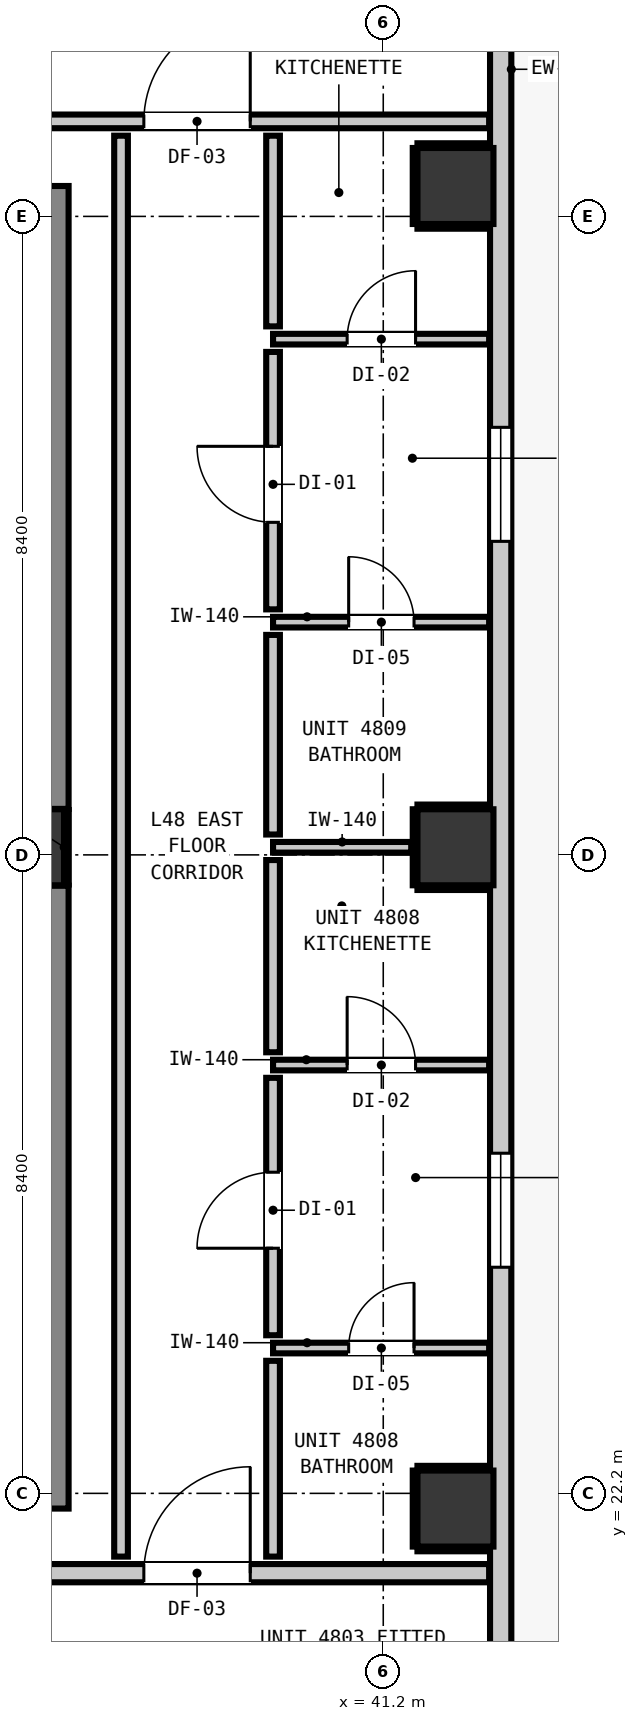
"""IFC4 building model, lengths in metres.
Left out: names, types, materials, properties, quantities, classifications, styles, units other than length and angle.
Written with IfcOpenShell. Run it as: python <this file> out.ifc"""

import sys

from ifc_helpers import new_model, si_unit, direction, frame, frame_2d, origin, origin_2d, place, context, subcontext, project, spatial, rectangle, extrude, element, fill, save


model = new_model("IFC4")
c1 = context("Model", 3, precision=1e-05, world=origin(), true_north=direction((0.0, 1.0)))
c2 = subcontext(c1, "Body", "Model", "MODEL_VIEW")
j1 = project(units=[si_unit("LENGTHUNIT", "METRE"), si_unit("PLANEANGLEUNIT", "RADIAN")], contexts=[c1])
p1 = place(None, origin())
s1 = spatial("IfcSite", under=j1, at=p1, CompositionType="ELEMENT")
p2 = place(p1, origin())
s2 = spatial("IfcBuilding", under=s1, at=p2, CompositionType="ELEMENT")
p3 = place(p2, frame((0.0, 0.0, 165.84)))
s3 = spatial("IfcBuildingStorey", under=s2, at=p3, CompositionType="ELEMENT", Elevation=165.84)
p4 = place(p3, frame((36.5, 30.7, 0.0), z_axis=(0.0, 0.0, 1.0), x_axis=(1.0, 0.0, 0.0)))
e1 = element("IfcColumn", 1, at=p4, inside=s3, PredefinedType="COLUMN", context=c2, shape_type="SweptSolid", body=[
    extrude(rectangle(XDim=1.0, YDim=1.0, at=origin_2d()), origin(), (0.0, 0.0, 1.0), 3.32),
])
p5 = place(p3, frame((36.56, 22.0, 0.0), z_axis=(0.0, 0.0, 1.0), x_axis=(0.0, 1.0, 0.0)))
e2 = element("IfcWall", 2, at=p5, inside=s3, PredefinedType="SHEAR", context=c2, shape_type="SweptSolid", body=[
    extrude(rectangle(XDim=8.195, YDim=1.0, at=frame_2d((4.098, 0.0))), origin(), (0.0, 0.0, 1.0), 3.32),
])
p6 = place(p3, frame((36.56, 31.205, 0.0), z_axis=(0.0, 0.0, 1.0), x_axis=(0.0, 1.0, 0.0)))
e3 = element("IfcWall", 3, at=p6, inside=s3, PredefinedType="SHEAR", context=c2, shape_type="SweptSolid", body=[
    extrude(rectangle(XDim=8.195, YDim=1.0, at=frame_2d((4.097, 0.0))), origin(), (0.0, 0.0, 1.0), 3.32),
])
for number, where, z_axis, x_axis in (
    (4, (42.15, 22.0, -0.2), (0.0, 0.0, 1.0), (1.0, 0.0, 0.0)),
    (5, (42.15, 30.7, -0.2), (0.0, 0.0, 1.0), (1.0, 0.0, 0.0)),
    (6, (42.15, 39.4, -0.2), (0.0, 0.0, 1.0), (1.0, 0.0, 0.0)),
):
    element("IfcColumn", number, at=place(p3, frame(where, z_axis=z_axis, x_axis=x_axis)), inside=s3, PredefinedType="COLUMN", context=c2, shape_type="SweptSolid", body=[
        extrude(rectangle(XDim=1.0, YDim=1.0, at=origin_2d()), origin(), (0.0, 0.0, 1.0), 3.52),
    ])
p7 = place(p3, frame((42.745, 49.845, 0.0), z_axis=(0.0, 0.0, 1.0), x_axis=(0.0, -1.0, 0.0)))
e7 = element("IfcWall", 7, at=p7, inside=s3, PredefinedType="STANDARD", context=c2, shape_type="SweptSolid", body=[
    extrude(rectangle(XDim=32.29, YDim=0.28, at=frame_2d((16.145, 0.0))), origin(), (0.0, 0.0, 1.0), 3.08),
])
p8 = place(p7, frame((0.503, 0.0, 0.0)))
e8 = element("IfcOpeningElement", 8, at=p8, cuts=e7, PredefinedType="OPENING", context=c2, shape_type="SweptSolid", body=[
    extrude(rectangle(XDim=1.1, YDim=2.15, at=frame_2d((0.55, 1.075))), frame((0.0, 0.15, 0.0), z_axis=(0.0, -1.0, 0.0), x_axis=(1.0, 0.0, 0.0)), (0.0, 0.0, 1.0), 0.3),
])
p9 = place(p7, frame((2.699, 0.0, 0.85)))
e9 = element("IfcOpeningElement", 9, at=p9, cuts=e7, PredefinedType="OPENING", context=c2, shape_type="SweptSolid", body=[
    extrude(rectangle(XDim=1.5, YDim=1.8, at=frame_2d((0.75, 0.9))), frame((0.0, 0.15, 0.0), z_axis=(0.0, -1.0, 0.0), x_axis=(1.0, 0.0, 0.0)), (0.0, 0.0, 1.0), 0.3),
])
p10 = place(p7, frame((23.17, 0.0, 0.85)))
e10 = element("IfcOpeningElement", 10, at=p10, cuts=e7, PredefinedType="OPENING", context=c2, shape_type="SweptSolid", body=[
    extrude(rectangle(XDim=1.5, YDim=1.8, at=frame_2d((0.75, 0.9))), frame((0.0, 0.15, 0.0), z_axis=(0.0, -1.0, 0.0), x_axis=(1.0, 0.0, 0.0)), (0.0, 0.0, 1.0), 0.3),
])
p11 = place(p7, frame((13.62, 0.0, 0.85)))
e11 = element("IfcOpeningElement", 11, at=p11, cuts=e7, PredefinedType="OPENING", context=c2, shape_type="SweptSolid", body=[
    extrude(rectangle(XDim=1.5, YDim=1.8, at=frame_2d((0.75, 0.9))), frame((0.0, 0.15, 0.0), z_axis=(0.0, -1.0, 0.0), x_axis=(1.0, 0.0, 0.0)), (0.0, 0.0, 1.0), 0.3),
])
p12 = place(p3, frame((12.983, 21.15, 0.0), z_axis=(0.0, 0.0, 1.0), x_axis=(1.0, 0.0, 0.0)))
e12 = element("IfcWall", 12, at=p12, inside=s3, PredefinedType="PARTITIONING", context=c2, shape_type="SweptSolid", body=[
    extrude(rectangle(XDim=29.61, YDim=0.24, at=frame_2d((14.805, 0.0))), origin(), (0.0, 0.0, 1.0), 3.08),
])
p13 = place(p12, frame((5.227, 0.0, 0.0)))
e13 = element("IfcOpeningElement", 13, at=p13, cuts=e12, PredefinedType="OPENING", context=c2, shape_type="SweptSolid", body=[
    extrude(rectangle(XDim=1.1, YDim=2.15, at=frame_2d((0.55, 1.075))), frame((0.0, 0.13, 0.0), z_axis=(0.0, -1.0, 0.0), x_axis=(1.0, 0.0, 0.0)), (0.0, 0.0, 1.0), 0.26),
])
p14 = place(p12, frame((25.067, 0.0, 0.0)))
e14 = element("IfcOpeningElement", 14, at=p14, cuts=e12, PredefinedType="OPENING", context=c2, shape_type="SweptSolid", body=[
    extrude(rectangle(XDim=1.4, YDim=2.15, at=frame_2d((0.7, 1.075))), frame((0.0, 0.13, 0.0), z_axis=(0.0, -1.0, 0.0), x_axis=(1.0, 0.0, 0.0)), (0.0, 0.0, 1.0), 0.26),
])
p15 = place(p3, frame((3.207, 40.25, 0.0), z_axis=(0.0, 0.0, 1.0), x_axis=(1.0, 0.0, 0.0)))
e15 = element("IfcWall", 15, at=p15, inside=s3, PredefinedType="PARTITIONING", context=c2, shape_type="SweptSolid", body=[
    extrude(rectangle(XDim=39.386, YDim=0.18, at=frame_2d((19.693, 0.0))), origin(), (0.0, 0.0, 1.0), 3.08),
])
p16 = place(p15, frame((14.228, 0.0, 0.0)))
e16 = element("IfcOpeningElement", 16, at=p16, cuts=e15, PredefinedType="OPENING", context=c2, shape_type="SweptSolid", body=[
    extrude(rectangle(XDim=1.4, YDim=2.15, at=frame_2d((0.7, 1.075))), frame((0.0, 0.1, 0.0), z_axis=(0.0, -1.0, 0.0), x_axis=(1.0, 0.0, 0.0)), (0.0, 0.0, 1.0), 0.2),
])
p17 = place(p15, frame((7.243, 0.0, 0.0)))
e17 = element("IfcOpeningElement", 17, at=p17, cuts=e15, PredefinedType="OPENING", context=c2, shape_type="SweptSolid", body=[
    extrude(rectangle(XDim=1.4, YDim=2.15, at=frame_2d((0.7, 1.075))), frame((0.0, 0.1, 0.0), z_axis=(0.0, -1.0, 0.0), x_axis=(1.0, 0.0, 0.0)), (0.0, 0.0, 1.0), 0.2),
])
p18 = place(p15, frame((34.843, 0.0, 0.0)))
e18 = element("IfcOpeningElement", 18, at=p18, cuts=e15, PredefinedType="OPENING", context=c2, shape_type="SweptSolid", body=[
    extrude(rectangle(XDim=1.4, YDim=2.15, at=frame_2d((0.7, 1.075))), frame((0.0, 0.1, 0.0), z_axis=(0.0, -1.0, 0.0), x_axis=(1.0, 0.0, 0.0)), (0.0, 0.0, 1.0), 0.2),
])
p19 = place(p3, frame((39.75, 24.112, 0.0), z_axis=(0.0, 0.0, 1.0), x_axis=(1.0, 0.0, 0.0)))
e19 = element("IfcWall", 19, at=p19, inside=s3, PredefinedType="PARTITIONING", context=c2, shape_type="SweptSolid", body=[
    extrude(rectangle(XDim=2.843, YDim=0.14, at=frame_2d((1.421, 0.0))), origin(), (0.0, 0.0, 1.0), 3.08),
])
p20 = place(p19, frame((0.995, 0.0, 0.0)))
e20 = element("IfcOpeningElement", 20, at=p20, cuts=e19, PredefinedType="OPENING", context=c2, shape_type="SweptSolid", body=[
    extrude(rectangle(XDim=0.86, YDim=2.02, at=frame_2d((0.43, 1.01))), frame((0.0, 0.08, 0.0), z_axis=(0.0, -1.0, 0.0), x_axis=(1.0, 0.0, 0.0)), (0.0, 0.0, 1.0), 0.16),
])
p21 = place(p3, frame((39.75, 27.835, 0.0), z_axis=(0.0, 0.0, 1.0), x_axis=(1.0, 0.0, 0.0)))
e21 = element("IfcWall", 21, at=p21, inside=s3, PredefinedType="PARTITIONING", context=c2, shape_type="SweptSolid", body=[
    extrude(rectangle(XDim=2.843, YDim=0.14, at=frame_2d((1.421, 0.0))), origin(), (0.0, 0.0, 1.0), 3.08),
])
p22 = place(p21, frame((0.975, 0.0, 0.0)))
e22 = element("IfcOpeningElement", 22, at=p22, cuts=e21, PredefinedType="OPENING", context=c2, shape_type="SweptSolid", body=[
    extrude(rectangle(XDim=0.9, YDim=2.1, at=frame_2d((0.45, 1.05))), frame((0.0, 0.08, 0.0), z_axis=(0.0, -1.0, 0.0), x_axis=(1.0, 0.0, 0.0)), (0.0, 0.0, 1.0), 0.16),
])
p23 = place(p3, frame((39.75, 30.7, 0.0), z_axis=(0.0, 0.0, 1.0), x_axis=(1.0, 0.0, 0.0)))
e23 = element("IfcWall", 23, at=p23, inside=s3, PredefinedType="PARTITIONING", context=c2, shape_type="SweptSolid", body=[
    extrude(rectangle(XDim=1.818, YDim=0.14, at=frame_2d((0.909, 0.0))), origin(), (0.0, 0.0, 1.0), 2.315),
])
p24 = place(p3, frame((39.75, 33.662, 0.0), z_axis=(0.0, 0.0, 1.0), x_axis=(1.0, 0.0, 0.0)))
e24 = element("IfcWall", 24, at=p24, inside=s3, PredefinedType="PARTITIONING", context=c2, shape_type="SweptSolid", body=[
    extrude(rectangle(XDim=2.843, YDim=0.14, at=frame_2d((1.421, 0.0))), origin(), (0.0, 0.0, 1.0), 3.08),
])
p25 = place(p24, frame((0.995, 0.0, 0.0)))
e25 = element("IfcOpeningElement", 25, at=p25, cuts=e24, PredefinedType="OPENING", context=c2, shape_type="SweptSolid", body=[
    extrude(rectangle(XDim=0.86, YDim=2.02, at=frame_2d((0.43, 1.01))), frame((0.0, 0.08, 0.0), z_axis=(0.0, -1.0, 0.0), x_axis=(1.0, 0.0, 0.0)), (0.0, 0.0, 1.0), 0.16),
])
p26 = place(p3, frame((39.75, 37.385, 0.0), z_axis=(0.0, 0.0, 1.0), x_axis=(1.0, 0.0, 0.0)))
e26 = element("IfcWall", 26, at=p26, inside=s3, PredefinedType="PARTITIONING", context=c2, shape_type="SweptSolid", body=[
    extrude(rectangle(XDim=2.843, YDim=0.14, at=frame_2d((1.421, 0.0))), origin(), (0.0, 0.0, 1.0), 3.08),
])
p27 = place(p26, frame((0.975, 0.0, 0.0)))
e27 = element("IfcOpeningElement", 27, at=p27, cuts=e26, PredefinedType="OPENING", context=c2, shape_type="SweptSolid", body=[
    extrude(rectangle(XDim=0.9, YDim=2.1, at=frame_2d((0.45, 1.05))), frame((0.0, 0.08, 0.0), z_axis=(0.0, -1.0, 0.0), x_axis=(1.0, 0.0, 0.0)), (0.0, 0.0, 1.0), 0.16),
])
p28 = place(p3, frame((37.75, 21.368, 0.0), z_axis=(0.0, 0.0, 1.0), x_axis=(0.0, 1.0, 0.0)))
e28 = element("IfcWall", 28, at=p28, inside=s3, PredefinedType="PARTITIONING", context=c2, shape_type="SweptSolid", body=[
    extrude(rectangle(XDim=18.694, YDim=0.18, at=frame_2d((9.347, 0.0))), origin(), (0.0, 0.0, 1.0), 3.08),
])
p29 = place(p3, frame((39.75, 21.368, 0.0), z_axis=(0.0, 0.0, 1.0), x_axis=(0.0, 1.0, 0.0)))
e29 = element("IfcWall", 29, at=p29, inside=s3, PredefinedType="PARTITIONING", context=c2, shape_type="SweptSolid", body=[
    extrude(rectangle(XDim=2.576, YDim=0.18, at=frame_2d((1.288, 0.0))), origin(), (0.0, 0.0, 1.0), 3.08),
])
p30 = place(p3, frame((39.75, 24.28, 0.0), z_axis=(0.0, 0.0, 1.0), x_axis=(0.0, 1.0, 0.0)))
e30 = element("IfcWall", 30, at=p30, inside=s3, PredefinedType="PARTITIONING", context=c2, shape_type="SweptSolid", body=[
    extrude(rectangle(XDim=3.387, YDim=0.18, at=frame_2d((1.693, 0.0))), origin(), (0.0, 0.0, 1.0), 3.08),
])
p31 = place(p30, frame((1.145, 0.0, 0.0)))
e31 = element("IfcOpeningElement", 31, at=p31, cuts=e30, PredefinedType="OPENING", context=c2, shape_type="SweptSolid", body=[
    extrude(rectangle(XDim=1.0, YDim=2.15, at=frame_2d((0.5, 1.075))), frame((0.0, 0.1, 0.0), z_axis=(0.0, -1.0, 0.0), x_axis=(1.0, 0.0, 0.0)), (0.0, 0.0, 1.0), 0.2),
])
p32 = place(p3, frame((39.75, 28.003, 0.0), z_axis=(0.0, 0.0, 1.0), x_axis=(0.0, 1.0, 0.0)))
e32 = element("IfcWall", 32, at=p32, inside=s3, PredefinedType="PARTITIONING", context=c2, shape_type="SweptSolid", body=[
    extrude(rectangle(XDim=2.529, YDim=0.18, at=frame_2d((1.265, 0.0))), origin(), (0.0, 0.0, 1.0), 3.08),
])
p33 = place(p3, frame((39.75, 30.868, 0.0), z_axis=(0.0, 0.0, 1.0), x_axis=(0.0, 1.0, 0.0)))
e33 = element("IfcWall", 33, at=p33, inside=s3, PredefinedType="PARTITIONING", context=c2, shape_type="SweptSolid", body=[
    extrude(rectangle(XDim=2.626, YDim=0.18, at=frame_2d((1.313, 0.0))), origin(), (0.0, 0.0, 1.0), 3.08),
])
p34 = place(p3, frame((39.75, 33.83, 0.0), z_axis=(0.0, 0.0, 1.0), x_axis=(0.0, 1.0, 0.0)))
e34 = element("IfcWall", 34, at=p34, inside=s3, PredefinedType="PARTITIONING", context=c2, shape_type="SweptSolid", body=[
    extrude(rectangle(XDim=3.387, YDim=0.18, at=frame_2d((1.693, 0.0))), origin(), (0.0, 0.0, 1.0), 3.08),
])
p35 = place(p34, frame((1.145, 0.0, 0.0)))
e35 = element("IfcOpeningElement", 35, at=p35, cuts=e34, PredefinedType="OPENING", context=c2, shape_type="SweptSolid", body=[
    extrude(rectangle(XDim=1.0, YDim=2.15, at=frame_2d((0.5, 1.075))), frame((0.0, 0.1, 0.0), z_axis=(0.0, -1.0, 0.0), x_axis=(1.0, 0.0, 0.0)), (0.0, 0.0, 1.0), 0.2),
])
p36 = place(p3, frame((39.75, 37.553, 0.0), z_axis=(0.0, 0.0, 1.0), x_axis=(0.0, 1.0, 0.0)))
e36 = element("IfcWall", 36, at=p36, inside=s3, PredefinedType="PARTITIONING", context=c2, shape_type="SweptSolid", body=[
    extrude(rectangle(XDim=2.509, YDim=0.18, at=frame_2d((1.254, 0.0))), origin(), (0.0, 0.0, 1.0), 3.08),
])
p37 = place(p3, frame((37.032, 30.21, 0.0), z_axis=(0.0, 0.0, 1.0), x_axis=(0.0, 1.0, 0.0)))
e37 = element("IfcWall", 37, at=p37, inside=s3, PredefinedType="PARTITIONING", context=c2, shape_type="SweptSolid", body=[
    extrude(rectangle(XDim=0.98, YDim=0.06, at=frame_2d((0.49, 0.0))), origin(), (0.0, 0.0, 1.0), 1.45),
])
for number, where, z_axis, x_axis in (
    (38, (41.65, 21.468, 0.0), (0.0, 0.0, 1.0), (1.0, 0.0, 0.0)),
    (39, (41.65, 22.532, 0.0), (0.0, 0.0, 1.0), (1.0, 0.0, 0.0)),
):
    element("IfcWall", number, at=place(p3, frame(where, z_axis=z_axis, x_axis=x_axis)), inside=s3, PredefinedType="PARTITIONING", context=c2, shape_type="SweptSolid", body=[
        extrude(rectangle(XDim=0.94, YDim=0.06, at=frame_2d((0.47, 0.0))), origin(), (0.0, 0.0, 1.0), 1.45),
    ])
p38 = place(p3, frame((41.618, 21.5, 0.0), z_axis=(0.0, 0.0, 1.0), x_axis=(0.0, 1.0, 0.0)))
e40 = element("IfcWall", 40, at=p38, inside=s3, PredefinedType="PARTITIONING", context=c2, shape_type="SweptSolid", body=[
    extrude(rectangle(XDim=1.0, YDim=0.06, at=frame_2d((0.5, 0.0))), origin(), (0.0, 0.0, 1.0), 1.45),
])
for number, where, z_axis, x_axis in (
    (41, (41.65, 30.168, 0.0), (0.0, 0.0, 1.0), (1.0, 0.0, 0.0)),
    (42, (41.65, 31.232, 0.0), (0.0, 0.0, 1.0), (1.0, 0.0, 0.0)),
):
    element("IfcWall", number, at=place(p3, frame(where, z_axis=z_axis, x_axis=x_axis)), inside=s3, PredefinedType="PARTITIONING", context=c2, shape_type="SweptSolid", body=[
        extrude(rectangle(XDim=0.94, YDim=0.06, at=frame_2d((0.47, 0.0))), origin(), (0.0, 0.0, 1.0), 1.45),
    ])
p39 = place(p3, frame((41.618, 30.2, 0.0), z_axis=(0.0, 0.0, 1.0), x_axis=(0.0, 1.0, 0.0)))
e43 = element("IfcWall", 43, at=p39, inside=s3, PredefinedType="PARTITIONING", context=c2, shape_type="SweptSolid", body=[
    extrude(rectangle(XDim=1.0, YDim=0.06, at=frame_2d((0.5, 0.0))), origin(), (0.0, 0.0, 1.0), 1.45),
])
for number, where, z_axis, x_axis in (
    (44, (41.65, 38.868, 0.0), (0.0, 0.0, 1.0), (1.0, 0.0, 0.0)),
    (45, (41.65, 39.932, 0.0), (0.0, 0.0, 1.0), (1.0, 0.0, 0.0)),
):
    element("IfcWall", number, at=place(p3, frame(where, z_axis=z_axis, x_axis=x_axis)), inside=s3, PredefinedType="PARTITIONING", context=c2, shape_type="SweptSolid", body=[
        extrude(rectangle(XDim=0.94, YDim=0.06, at=frame_2d((0.47, 0.0))), origin(), (0.0, 0.0, 1.0), 1.45),
    ])
p40 = place(p3, frame((41.618, 38.9, 0.0), z_axis=(0.0, 0.0, 1.0), x_axis=(0.0, 1.0, 0.0)))
e46 = element("IfcWall", 46, at=p40, inside=s3, PredefinedType="PARTITIONING", context=c2, shape_type="SweptSolid", body=[
    extrude(rectangle(XDim=1.0, YDim=0.06, at=frame_2d((0.5, 0.0))), origin(), (0.0, 0.0, 1.0), 1.45),
])
p41 = place(p10, origin())
e47 = element("IfcWindow", 47, at=p41, inside=s3, PartitioningType="SINGLE_PANEL", PredefinedType="WINDOW", context=c2, shape_type="SweptSolid", body=[
    extrude(rectangle(XDim=1.5, YDim=1.8, at=frame_2d((0.75, 0.9))), frame((0.0, 0.03, 0.0), z_axis=(0.0, -1.0, 0.0), x_axis=(1.0, 0.0, 0.0)), (0.0, 0.0, 1.0), 0.06),
])
fill(e10, e47)
p42 = place(p11, origin())
e48 = element("IfcWindow", 48, at=p42, inside=s3, PartitioningType="SINGLE_PANEL", PredefinedType="WINDOW", context=c2, shape_type="SweptSolid", body=[
    extrude(rectangle(XDim=1.5, YDim=1.8, at=frame_2d((0.75, 0.9))), frame((0.0, 0.03, 0.0), z_axis=(0.0, -1.0, 0.0), x_axis=(1.0, 0.0, 0.0)), (0.0, 0.0, 1.0), 0.06),
])
fill(e11, e48)
p43 = place(p14, origin())
e49 = element("IfcDoor", 49, at=p43, inside=s3, OperationType="SINGLE_SWING_RIGHT", PredefinedType="DOOR", context=c2, shape_type="SweptSolid", body=[
    extrude(rectangle(XDim=1.4, YDim=2.15, at=frame_2d((0.7, 1.075))), frame((0.0, 0.025, 0.0), z_axis=(0.0, -1.0, 0.0), x_axis=(1.0, 0.0, 0.0)), (0.0, 0.0, 1.0), 0.05),
])
fill(e14, e49)
p44 = place(p18, origin())
e50 = element("IfcDoor", 50, at=p44, inside=s3, OperationType="SINGLE_SWING_RIGHT", PredefinedType="DOOR", context=c2, shape_type="SweptSolid", body=[
    extrude(rectangle(XDim=1.4, YDim=2.15, at=frame_2d((0.7, 1.075))), frame((0.0, 0.025, 0.0), z_axis=(0.0, -1.0, 0.0), x_axis=(1.0, 0.0, 0.0)), (0.0, 0.0, 1.0), 0.05),
])
fill(e18, e50)
p45 = place(p31, origin())
e51 = element("IfcDoor", 51, at=p45, inside=s3, OperationType="SINGLE_SWING_LEFT", PredefinedType="DOOR", context=c2, shape_type="SweptSolid", body=[
    extrude(rectangle(XDim=1.0, YDim=2.15, at=frame_2d((0.5, 1.075))), frame((0.0, 0.025, 0.0), z_axis=(0.0, -1.0, 0.0), x_axis=(1.0, 0.0, 0.0)), (0.0, 0.0, 1.0), 0.05),
])
fill(e31, e51)
p46 = place(p20, origin())
e52 = element("IfcDoor", 52, at=p46, inside=s3, OperationType="SINGLE_SWING_RIGHT", PredefinedType="DOOR", context=c2, shape_type="SweptSolid", body=[
    extrude(rectangle(XDim=0.86, YDim=2.02, at=frame_2d((0.43, 1.01))), frame((0.0, 0.025, 0.0), z_axis=(0.0, -1.0, 0.0), x_axis=(1.0, 0.0, 0.0)), (0.0, 0.0, 1.0), 0.05),
])
fill(e20, e52)
p47 = place(p22, origin())
e53 = element("IfcDoor", 53, at=p47, inside=s3, OperationType="SINGLE_SWING_LEFT", PredefinedType="DOOR", context=c2, shape_type="SweptSolid", body=[
    extrude(rectangle(XDim=0.9, YDim=2.1, at=frame_2d((0.45, 1.05))), frame((0.0, 0.025, 0.0), z_axis=(0.0, -1.0, 0.0), x_axis=(1.0, 0.0, 0.0)), (0.0, 0.0, 1.0), 0.05),
])
fill(e22, e53)
p48 = place(p35, origin())
e54 = element("IfcDoor", 54, at=p48, inside=s3, OperationType="SINGLE_SWING_RIGHT", PredefinedType="DOOR", context=c2, shape_type="SweptSolid", body=[
    extrude(rectangle(XDim=1.0, YDim=2.15, at=frame_2d((0.5, 1.075))), frame((0.0, 0.025, 0.0), z_axis=(0.0, -1.0, 0.0), x_axis=(1.0, 0.0, 0.0)), (0.0, 0.0, 1.0), 0.05),
])
fill(e35, e54)
p49 = place(p25, origin())
e55 = element("IfcDoor", 55, at=p49, inside=s3, OperationType="SINGLE_SWING_LEFT", PredefinedType="DOOR", context=c2, shape_type="SweptSolid", body=[
    extrude(rectangle(XDim=0.86, YDim=2.02, at=frame_2d((0.43, 1.01))), frame((0.0, 0.025, 0.0), z_axis=(0.0, -1.0, 0.0), x_axis=(1.0, 0.0, 0.0)), (0.0, 0.0, 1.0), 0.05),
])
fill(e25, e55)
p50 = place(p27, origin())
e56 = element("IfcDoor", 56, at=p50, inside=s3, OperationType="SINGLE_SWING_RIGHT", PredefinedType="DOOR", context=c2, shape_type="SweptSolid", body=[
    extrude(rectangle(XDim=0.9, YDim=2.1, at=frame_2d((0.45, 1.05))), frame((0.0, 0.025, 0.0), z_axis=(0.0, -1.0, 0.0), x_axis=(1.0, 0.0, 0.0)), (0.0, 0.0, 1.0), 0.05),
])
fill(e27, e56)
save(model, sys.argv[1])
